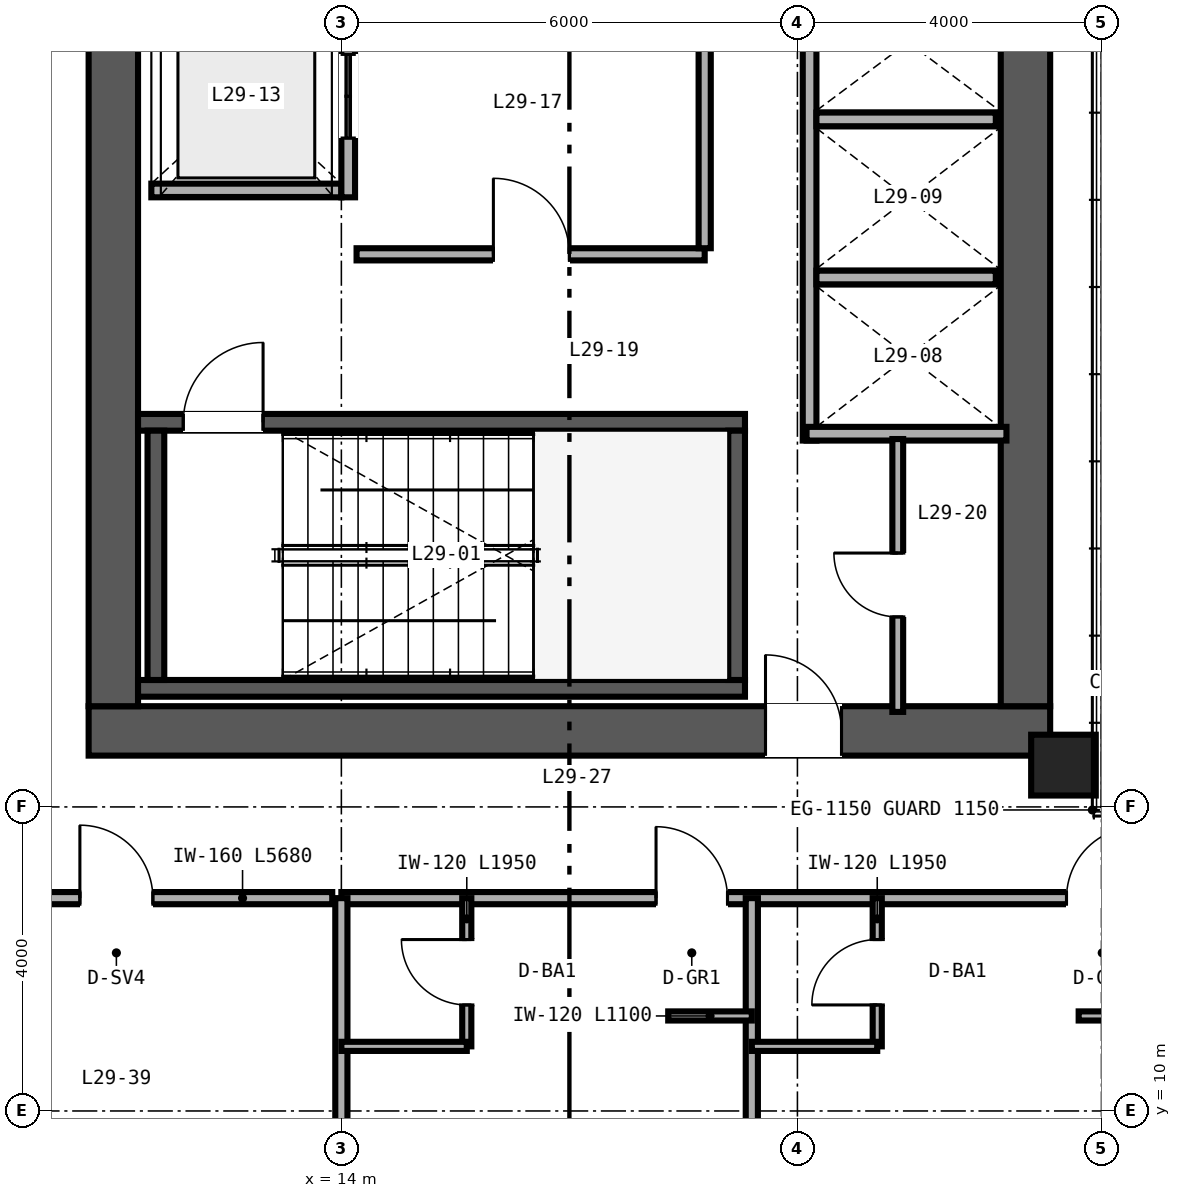
"""IFC4 building model, lengths in metres.
Left out: names, types, materials, properties, quantities, classifications, styles, units other than length and angle.
Written with IfcOpenShell. Run it as: python <this file> out.ifc"""

import sys

from ifc_helpers import new_model, si_unit, direction, frame, frame_2d, origin, origin_2d, place, context, subcontext, project, spatial, rectangle, hollow_rectangle, extrude, source, transform, mapped, element, fill, save


model = new_model("IFC4")
c1 = context("Model", 3, precision=1e-05, world=origin(), true_north=direction((0.0, 1.0)))
c2 = subcontext(c1, "Body", "Model", "MODEL_VIEW")
j1 = project(units=[si_unit("LENGTHUNIT", "METRE"), si_unit("PLANEANGLEUNIT", "RADIAN")], contexts=[c1])
p1 = place(None, origin())
s1 = spatial("IfcSite", under=j1, at=p1, CompositionType="ELEMENT")
p2 = place(p1, origin())
s2 = spatial("IfcBuilding", under=s1, at=p2, CompositionType="ELEMENT")
p3 = place(p2, frame((0.0, 0.0, 118.8)))
s3 = spatial("IfcBuildingStorey", under=s2, at=p3, CompositionType="ELEMENT", Elevation=118.8)
p4 = place(p3, frame((10.675, 15.0, 0.0), z_axis=(0.0, 0.0, 1.0), x_axis=(1.0, 0.0, 0.0)))
e1 = element("IfcWall", 1, at=p4, inside=s3, PredefinedType="SHEAR", context=c2, shape_type="SweptSolid", body=[
    extrude(rectangle(XDim=12.65, YDim=0.65, at=frame_2d((6.325, 0.0))), origin(), (0.0, 0.0, 1.0), 3.36),
])
p5 = place(p4, frame((8.905, 0.0, 0.0)))
e2 = element("IfcOpeningElement", 2, at=p5, cuts=e1, PredefinedType="OPENING", context=c2, shape_type="SweptSolid", body=[
    extrude(rectangle(XDim=1.0, YDim=2.15, at=frame_2d((0.5, 1.075))), frame((0.0, 0.335, 0.0), z_axis=(0.0, -1.0, 0.0), x_axis=(1.0, 0.0, 0.0)), (0.0, 0.0, 1.0), 0.67),
])
for number, where, z_axis, x_axis in (
    (3, (11.0, 15.325, 0.0), (0.0, 0.0, 1.0), (0.0, 1.0, 0.0)),
    (4, (23.0, 15.325, 0.0), (0.0, 0.0, 1.0), (0.0, 1.0, 0.0)),
):
    element("IfcWall", number, at=place(p3, frame(where, z_axis=z_axis, x_axis=x_axis)), inside=s3, PredefinedType="SHEAR", context=c2, shape_type="SweptSolid", body=[
        extrude(rectangle(XDim=21.35, YDim=0.65, at=frame_2d((10.675, 0.0))), origin(), (0.0, 0.0, 1.0), 3.36),
    ])
p6 = place(p3, frame((11.325, 15.56, 0.0), z_axis=(0.0, 0.0, 1.0), x_axis=(1.0, 0.0, 0.0)))
e5 = element("IfcWall", 5, at=p6, inside=s3, PredefinedType="SHEAR", context=c2, shape_type="SweptSolid", body=[
    extrude(rectangle(XDim=7.985, YDim=0.22, at=frame_2d((3.993, 0.0))), origin(), (0.0, 0.0, 1.0), 3.4),
])
p7 = place(p3, frame((11.325, 19.06, 0.0), z_axis=(0.0, 0.0, 1.0), x_axis=(1.0, 0.0, 0.0)))
e6 = element("IfcWall", 6, at=p7, inside=s3, PredefinedType="SHEAR", context=c2, shape_type="SweptSolid", body=[
    extrude(rectangle(XDim=7.985, YDim=0.22, at=frame_2d((3.993, 0.0))), origin(), (0.0, 0.0, 1.0), 3.4),
])
p8 = place(p7, frame((0.595, 0.0, 0.0)))
e7 = element("IfcOpeningElement", 7, at=p8, cuts=e6, PredefinedType="OPENING", context=c2, shape_type="SweptSolid", body=[
    extrude(rectangle(XDim=1.05, YDim=2.15, at=frame_2d((0.525, 1.075))), frame((0.0, 0.12, 0.0), z_axis=(0.0, -1.0, 0.0), x_axis=(1.0, 0.0, 0.0)), (0.0, 0.0, 1.0), 0.24),
])
for number, where, z_axis, x_axis in (
    (8, (11.56, 15.67, 0.0), (0.0, 0.0, 1.0), (0.0, 1.0, 0.0)),
    (9, (19.2, 15.67, 0.0), (0.0, 0.0, 1.0), (0.0, 1.0, 0.0)),
):
    element("IfcWall", number, at=place(p3, frame(where, z_axis=z_axis, x_axis=x_axis)), inside=s3, PredefinedType="SHEAR", context=c2, shape_type="SweptSolid", body=[
        extrude(rectangle(XDim=3.28, YDim=0.22, at=frame_2d((1.64, 0.0))), origin(), (0.0, 0.0, 1.0), 3.4),
    ])
m1 = source(origin(), c2, "Body", "SweptSolid", [
    extrude(hollow_rectangle(XDim=0.85, YDim=0.8, WallThickness=0.032, at=origin_2d()), origin(), (0.0, 0.0, 1.0), 3.36),
])
p9 = place(p3, frame((23.5, 14.55, 0.0), z_axis=(0.0, 0.0, 1.0), x_axis=(1.0, 0.0, 0.0)))
e10 = element("IfcColumn", 10, at=p9, inside=s3, PredefinedType="COLUMN", context=c2, shape_type="MappedRepresentation", body=[
    mapped(m1, transform((0.0, 0.0, 0.0), scale=1.0)),
])
p10 = place(p3, frame((20.16, 18.82, 0.0), z_axis=(0.0, 0.0, 1.0), x_axis=(0.0, 1.0, 0.0)))
e11 = element("IfcWall", 11, at=p10, inside=s3, PredefinedType="SOLIDWALL", context=c2, shape_type="SweptSolid", body=[
    extrude(rectangle(XDim=6.32, YDim=0.18, at=frame_2d((3.16, 0.0))), origin(), (0.0, 0.0, 1.0), 2.36),
])
p11 = place(p3, frame((20.12, 18.91, 0.0), z_axis=(0.0, 0.0, 1.0), x_axis=(1.0, 0.0, 0.0)))
e12 = element("IfcWall", 12, at=p11, inside=s3, PredefinedType="SOLIDWALL", context=c2, shape_type="SweptSolid", body=[
    extrude(rectangle(XDim=2.63, YDim=0.18, at=frame_2d((1.315, 0.0))), origin(), (0.0, 0.0, 1.0), 3.36),
])
p12 = place(p3, frame((20.25, 20.965, 0.0), z_axis=(0.0, 0.0, 1.0), x_axis=(1.0, 0.0, 0.0)))
e13 = element("IfcWall", 13, at=p12, inside=s3, PredefinedType="SOLIDWALL", context=c2, shape_type="SweptSolid", body=[
    extrude(rectangle(XDim=2.36, YDim=0.18, at=frame_2d((1.18, 0.0))), origin(), (0.0, 0.0, 1.0), 2.36),
])
p13 = place(p3, frame((20.25, 23.045, 0.0), z_axis=(0.0, 0.0, 1.0), x_axis=(1.0, 0.0, 0.0)))
e14 = element("IfcWall", 14, at=p13, inside=s3, PredefinedType="SOLIDWALL", context=c2, shape_type="SweptSolid", body=[
    extrude(rectangle(XDim=2.36, YDim=0.18, at=frame_2d((1.18, 0.0))), origin(), (0.0, 0.0, 1.0), 3.36),
])
p14 = place(p3, frame((11.5, 22.11, 0.0), z_axis=(0.0, 0.0, 1.0), x_axis=(1.0, 0.0, 0.0)))
e15 = element("IfcWall", 15, at=p14, inside=s3, PredefinedType="SOLIDWALL", context=c2, shape_type="SweptSolid", body=[
    extrude(rectangle(XDim=2.5, YDim=0.18, at=frame_2d((1.25, 0.0))), origin(), (0.0, 0.0, 1.0), 3.36),
])
p15 = place(p3, frame((14.09, 22.02, 0.0), z_axis=(0.0, 0.0, 1.0), x_axis=(0.0, 1.0, 0.0)))
e16 = element("IfcWall", 16, at=p15, inside=s3, PredefinedType="SOLIDWALL", context=c2, shape_type="SweptSolid", body=[
    extrude(rectangle(XDim=2.66, YDim=0.18, at=frame_2d((1.33, 0.0))), origin(), (0.0, 0.0, 1.0), 3.36),
])
p16 = place(p15, frame((0.78, 0.0, 0.0)))
e17 = element("IfcOpeningElement", 17, at=p16, cuts=e16, PredefinedType="OPENING", context=c2, shape_type="SweptSolid", body=[
    extrude(rectangle(XDim=1.1, YDim=2.2, at=frame_2d((0.55, 1.1))), frame((0.0, 0.1, 0.0), z_axis=(0.0, -1.0, 0.0), x_axis=(1.0, 0.0, 0.0)), (0.0, 0.0, 1.0), 0.2),
])
p17 = place(p3, frame((14.2, 21.27, 0.0), z_axis=(0.0, 0.0, 1.0), x_axis=(1.0, 0.0, 0.0)))
e18 = element("IfcWall", 18, at=p17, inside=s3, PredefinedType="PARTITIONING", context=c2, shape_type="SweptSolid", body=[
    extrude(rectangle(XDim=4.58, YDim=0.16, at=frame_2d((2.29, 0.0))), origin(), (0.0, 0.0, 1.0), 3.36),
])
p18 = place(p17, frame((1.8, 0.0, 0.0)))
e19 = element("IfcOpeningElement", 19, at=p18, cuts=e18, PredefinedType="OPENING", context=c2, shape_type="SweptSolid", body=[
    extrude(rectangle(XDim=1.0, YDim=2.15, at=frame_2d((0.5, 1.075))), frame((0.0, 0.09, 0.0), z_axis=(0.0, -1.0, 0.0), x_axis=(1.0, 0.0, 0.0)), (0.0, 0.0, 1.0), 0.18),
])
p19 = place(p3, frame((18.78, 21.35, 0.0), z_axis=(0.0, 0.0, 1.0), x_axis=(0.0, 1.0, 0.0)))
e20 = element("IfcWall", 20, at=p19, inside=s3, PredefinedType="PARTITIONING", context=c2, shape_type="SweptSolid", body=[
    extrude(rectangle(XDim=3.81, YDim=0.16, at=frame_2d((1.905, 0.0))), origin(), (0.0, 0.0, 1.0), 3.36),
])
p20 = place(p3, frame((21.32, 15.25, 0.0), z_axis=(0.0, 0.0, 1.0), x_axis=(0.0, 1.0, 0.0)))
e21 = element("IfcWall", 21, at=p20, inside=s3, PredefinedType="PARTITIONING", context=c2, shape_type="SweptSolid", body=[
    extrude(rectangle(XDim=3.59, YDim=0.142, at=frame_2d((1.795, 0.0))), origin(), (0.0, 0.0, 1.0), 3.36),
])
p21 = place(p20, frame((1.25, 0.0, 0.0)))
e22 = element("IfcOpeningElement", 22, at=p21, cuts=e21, PredefinedType="OPENING", context=c2, shape_type="SweptSolid", body=[
    extrude(rectangle(XDim=0.84, YDim=2.1, at=frame_2d((0.42, 1.05))), frame((0.0, 0.081, 0.0), z_axis=(0.0, -1.0, 0.0), x_axis=(1.0, 0.0, 0.0)), (0.0, 0.0, 1.0), 0.162),
])
p22 = place(p3, frame((8.2, 12.8, 0.0), z_axis=(0.0, 0.0, 1.0), x_axis=(1.0, 0.0, 0.0)))
e23 = element("IfcWall", 23, at=p22, inside=s3, PredefinedType="PARTITIONING", context=c2, shape_type="SweptSolid", body=[
    extrude(rectangle(XDim=5.68, YDim=0.16, at=frame_2d((2.84, 0.0))), origin(), (0.0, 0.0, 1.0), 3.36),
])
p23 = place(p22, frame((2.36, 0.0, 0.0)))
e24 = element("IfcOpeningElement", 24, at=p23, cuts=e23, PredefinedType="OPENING", context=c2, shape_type="SweptSolid", body=[
    extrude(rectangle(XDim=0.96, YDim=2.15, at=frame_2d((0.48, 1.075))), frame((0.0, 0.09, 0.0), z_axis=(0.0, -1.0, 0.0), x_axis=(1.0, 0.0, 0.0)), (0.0, 0.0, 1.0), 0.18),
])
p24 = place(p3, frame((14.0, 12.8, 0.0), z_axis=(0.0, 0.0, 1.0), x_axis=(1.0, 0.0, 0.0)))
e25 = element("IfcWall", 25, at=p24, inside=s3, PredefinedType="PARTITIONING", context=c2, shape_type="SweptSolid", body=[
    extrude(rectangle(XDim=36.0, YDim=0.16, at=frame_2d((18.0, 0.0))), origin(), (0.0, 0.0, 1.0), 2.581),
])
p25 = place(p24, frame((4.14, 0.0, 0.0)))
e26 = element("IfcOpeningElement", 26, at=p25, cuts=e25, PredefinedType="OPENING", context=c2, shape_type="SweptSolid", body=[
    extrude(rectangle(XDim=0.94, YDim=2.15, at=frame_2d((0.47, 1.075))), frame((0.0, 0.09, 0.0), z_axis=(0.0, -1.0, 0.0), x_axis=(1.0, 0.0, 0.0)), (0.0, 0.0, 1.0), 0.18),
])
p26 = place(p24, frame((9.54, 0.0, 0.0)))
e27 = element("IfcOpeningElement", 27, at=p26, cuts=e25, PredefinedType="OPENING", context=c2, shape_type="SweptSolid", body=[
    extrude(rectangle(XDim=0.94, YDim=2.15, at=frame_2d((0.47, 1.075))), frame((0.0, 0.09, 0.0), z_axis=(0.0, -1.0, 0.0), x_axis=(1.0, 0.0, 0.0)), (0.0, 0.0, 1.0), 0.18),
])
p27 = place(p24, frame((13.22, 0.0, 0.0)))
e28 = element("IfcOpeningElement", 28, at=p27, cuts=e25, PredefinedType="OPENING", context=c2, shape_type="SweptSolid", body=[
    extrude(rectangle(XDim=0.96, YDim=2.15, at=frame_2d((0.48, 1.075))), frame((0.0, 0.09, 0.0), z_axis=(0.0, -1.0, 0.0), x_axis=(1.0, 0.0, 0.0)), (0.0, 0.0, 1.0), 0.18),
])
p28 = place(p24, frame((19.02, 0.0, 0.0)))
e29 = element("IfcOpeningElement", 29, at=p28, cuts=e25, PredefinedType="OPENING", context=c2, shape_type="SweptSolid", body=[
    extrude(rectangle(XDim=0.96, YDim=2.15, at=frame_2d((0.48, 1.075))), frame((0.0, 0.09, 0.0), z_axis=(0.0, -1.0, 0.0), x_axis=(1.0, 0.0, 0.0)), (0.0, 0.0, 1.0), 0.18),
])
p29 = place(p24, frame((24.62, 0.0, 0.0)))
e30 = element("IfcOpeningElement", 30, at=p29, cuts=e25, PredefinedType="OPENING", context=c2, shape_type="SweptSolid", body=[
    extrude(rectangle(XDim=0.96, YDim=2.15, at=frame_2d((0.48, 1.075))), frame((0.0, 0.09, 0.0), z_axis=(0.0, -1.0, 0.0), x_axis=(1.0, 0.0, 0.0)), (0.0, 0.0, 1.0), 0.18),
])
p30 = place(p24, frame((30.74, 0.0, 0.0)))
e31 = element("IfcOpeningElement", 31, at=p30, cuts=e25, PredefinedType="OPENING", context=c2, shape_type="SweptSolid", body=[
    extrude(rectangle(XDim=0.94, YDim=2.15, at=frame_2d((0.47, 1.075))), frame((0.0, 0.09, 0.0), z_axis=(0.0, -1.0, 0.0), x_axis=(1.0, 0.0, 0.0)), (0.0, 0.0, 1.0), 0.18),
])
p31 = place(p24, frame((33.52, 0.0, 0.0)))
e32 = element("IfcOpeningElement", 32, at=p31, cuts=e25, PredefinedType="OPENING", context=c2, shape_type="SweptSolid", body=[
    extrude(rectangle(XDim=0.96, YDim=2.15, at=frame_2d((0.48, 1.075))), frame((0.0, 0.09, 0.0), z_axis=(0.0, -1.0, 0.0), x_axis=(1.0, 0.0, 0.0)), (0.0, 0.0, 1.0), 0.18),
])
for number, where, z_axis, x_axis in (
    (33, (14.0, 2.36, 0.0), (0.0, 0.0, 1.0), (0.0, 1.0, 0.0)),
    (34, (19.4, 2.36, 0.0), (0.0, 0.0, 1.0), (0.0, 1.0, 0.0)),
):
    element("IfcWall", number, at=place(p3, frame(where, z_axis=z_axis, x_axis=x_axis)), inside=s3, PredefinedType="PARTITIONING", context=c2, shape_type="SweptSolid", body=[
        extrude(rectangle(XDim=10.44, YDim=0.16, at=frame_2d((5.22, 0.0))), origin(), (0.0, 0.0, 1.0), 2.667),
    ])
p32 = place(p3, frame((15.65, 10.85, 0.0), z_axis=(0.0, 0.0, 1.0), x_axis=(0.0, 1.0, 0.0)))
e35 = element("IfcWall", 35, at=p32, inside=s3, PredefinedType="PARTITIONING", context=c2, shape_type="SweptSolid", body=[
    extrude(rectangle(XDim=1.95, YDim=0.12, at=frame_2d((0.975, 0.0))), origin(), (0.0, 0.0, 1.0), 3.36),
])
p33 = place(p32, frame((0.545, 0.0, 0.0)))
e36 = element("IfcOpeningElement", 36, at=p33, cuts=e35, PredefinedType="OPENING", context=c2, shape_type="SweptSolid", body=[
    extrude(rectangle(XDim=0.86, YDim=2.1, at=frame_2d((0.43, 1.05))), frame((0.0, 0.07, 0.0), z_axis=(0.0, -1.0, 0.0), x_axis=(1.0, 0.0, 0.0)), (0.0, 0.0, 1.0), 0.14),
])
p34 = place(p3, frame((14.0, 10.85, 0.0), z_axis=(0.0, 0.0, 1.0), x_axis=(1.0, 0.0, 0.0)))
e37 = element("IfcWall", 37, at=p34, inside=s3, PredefinedType="PARTITIONING", context=c2, shape_type="SweptSolid", body=[
    extrude(rectangle(XDim=1.65, YDim=0.12, at=frame_2d((0.825, 0.0))), origin(), (0.0, 0.0, 1.0), 3.36),
])
p35 = place(p3, frame((18.3, 11.25, 0.0), z_axis=(0.0, 0.0, 1.0), x_axis=(1.0, 0.0, 0.0)))
e38 = element("IfcWall", 38, at=p35, inside=s3, PredefinedType="PARTITIONING", context=c2, shape_type="SweptSolid", body=[
    extrude(rectangle(XDim=1.1, YDim=0.12, at=frame_2d((0.55, 0.0))), origin(), (0.0, 0.0, 1.0), 3.36),
])
p36 = place(p3, frame((21.05, 10.85, 0.0), z_axis=(0.0, 0.0, 1.0), x_axis=(0.0, 1.0, 0.0)))
e39 = element("IfcWall", 39, at=p36, inside=s3, PredefinedType="PARTITIONING", context=c2, shape_type="SweptSolid", body=[
    extrude(rectangle(XDim=1.95, YDim=0.12, at=frame_2d((0.975, 0.0))), origin(), (0.0, 0.0, 1.0), 3.36),
])
p37 = place(p36, frame((0.545, 0.0, 0.0)))
e40 = element("IfcOpeningElement", 40, at=p37, cuts=e39, PredefinedType="OPENING", context=c2, shape_type="SweptSolid", body=[
    extrude(rectangle(XDim=0.86, YDim=2.1, at=frame_2d((0.43, 1.05))), frame((0.0, 0.07, 0.0), z_axis=(0.0, -1.0, 0.0), x_axis=(1.0, 0.0, 0.0)), (0.0, 0.0, 1.0), 0.14),
])
p38 = place(p3, frame((19.4, 10.85, 0.0), z_axis=(0.0, 0.0, 1.0), x_axis=(1.0, 0.0, 0.0)))
e41 = element("IfcWall", 41, at=p38, inside=s3, PredefinedType="PARTITIONING", context=c2, shape_type="SweptSolid", body=[
    extrude(rectangle(XDim=1.65, YDim=0.12, at=frame_2d((0.825, 0.0))), origin(), (0.0, 0.0, 1.0), 3.36),
])
p39 = place(p3, frame((23.7, 11.25, 0.0), z_axis=(0.0, 0.0, 1.0), x_axis=(1.0, 0.0, 0.0)))
e42 = element("IfcWall", 42, at=p39, inside=s3, PredefinedType="PARTITIONING", context=c2, shape_type="SweptSolid", body=[
    extrude(rectangle(XDim=1.1, YDim=0.12, at=frame_2d((0.55, 0.0))), origin(), (0.0, 0.0, 1.0), 2.581),
])
m2 = source(origin(), c2, "Body", "SweptSolid", [
    extrude(rectangle(XDim=1.05, YDim=2.15, at=frame_2d((0.525, 1.075))), frame((0.0, 0.025, 0.0), z_axis=(0.0, -1.0, 0.0), x_axis=(1.0, 0.0, 0.0)), (0.0, 0.0, 1.0), 0.05),
])
p40 = place(p8, origin())
e43 = element("IfcDoor", 43, at=p40, inside=s3, OperationType="SINGLE_SWING_RIGHT", PredefinedType="DOOR", context=c2, shape_type="MappedRepresentation", body=[
    mapped(m2, transform((0.0, 0.0, 0.0), scale=1.0)),
])
fill(e7, e43)
m3 = source(origin(), c2, "Body", "SweptSolid", [
    extrude(rectangle(XDim=1.1, YDim=2.2, at=frame_2d((0.55, 1.1))), frame((0.0, 0.025, 0.0), z_axis=(0.0, -1.0, 0.0), x_axis=(1.0, 0.0, 0.0)), (0.0, 0.0, 1.0), 0.05),
])
p41 = place(p16, origin())
e44 = element("IfcDoor", 44, at=p41, inside=s3, OperationType="DOUBLE_DOOR_SLIDING", PredefinedType="DOOR", context=c2, shape_type="MappedRepresentation", body=[
    mapped(m3, transform((0.0, 0.0, 0.0), scale=1.0)),
])
fill(e17, e44)
m4 = source(origin(), c2, "Body", "SweptSolid", [
    extrude(rectangle(XDim=1.0, YDim=2.15, at=frame_2d((0.5, 1.075))), frame((0.0, 0.025, 0.0), z_axis=(0.0, -1.0, 0.0), x_axis=(1.0, 0.0, 0.0)), (0.0, 0.0, 1.0), 0.05),
])
p42 = place(p18, origin())
e45 = element("IfcDoor", 45, at=p42, inside=s3, OperationType="SINGLE_SWING_LEFT", PredefinedType="DOOR", context=c2, shape_type="MappedRepresentation", body=[
    mapped(m4, transform((0.0, 0.0, 0.0), scale=1.0)),
])
fill(e19, e45)
m5 = source(origin(), c2, "Body", "SweptSolid", [
    extrude(rectangle(XDim=0.84, YDim=2.1, at=frame_2d((0.42, 1.05))), frame((0.0, 0.025, 0.0), z_axis=(0.0, -1.0, 0.0), x_axis=(1.0, 0.0, 0.0)), (0.0, 0.0, 1.0), 0.05),
])
p43 = place(p21, origin())
e46 = element("IfcDoor", 46, at=p43, inside=s3, OperationType="SINGLE_SWING_RIGHT", PredefinedType="DOOR", context=c2, shape_type="MappedRepresentation", body=[
    mapped(m5, transform((0.0, 0.0, 0.0), scale=1.0)),
])
fill(e22, e46)
p44 = place(p5, origin())
e47 = element("IfcDoor", 47, at=p44, inside=s3, OperationType="SINGLE_SWING_LEFT", PredefinedType="DOOR", context=c2, shape_type="MappedRepresentation", body=[
    mapped(m4, transform((0.0, 0.0, 0.0), scale=1.0)),
])
fill(e2, e47)
m6 = source(origin(), c2, "Body", "SweptSolid", [
    extrude(rectangle(XDim=0.96, YDim=2.15, at=frame_2d((0.48, 1.075))), frame((0.0, 0.025, 0.0), z_axis=(0.0, -1.0, 0.0), x_axis=(1.0, 0.0, 0.0)), (0.0, 0.0, 1.0), 0.05),
])
p45 = place(p23, origin())
e48 = element("IfcDoor", 48, at=p45, inside=s3, OperationType="SINGLE_SWING_LEFT", PredefinedType="DOOR", context=c2, shape_type="MappedRepresentation", body=[
    mapped(m6, transform((0.0, 0.0, 0.0), scale=1.0)),
])
fill(e24, e48)
m7 = source(origin(), c2, "Body", "SweptSolid", [
    extrude(rectangle(XDim=0.86, YDim=2.1, at=frame_2d((0.43, 1.05))), frame((0.0, 0.025, 0.0), z_axis=(0.0, -1.0, 0.0), x_axis=(1.0, 0.0, 0.0)), (0.0, 0.0, 1.0), 0.05),
])
p46 = place(p33, origin())
e49 = element("IfcDoor", 49, at=p46, inside=s3, OperationType="SINGLE_SWING_RIGHT", PredefinedType="DOOR", context=c2, shape_type="MappedRepresentation", body=[
    mapped(m7, transform((0.0, 0.0, 0.0), scale=1.0)),
])
fill(e36, e49)
p47 = place(p37, origin())
e50 = element("IfcDoor", 50, at=p47, inside=s3, OperationType="SINGLE_SWING_LEFT", PredefinedType="DOOR", context=c2, shape_type="MappedRepresentation", body=[
    mapped(m7, transform((0.0, 0.0, 0.0), scale=1.0)),
])
fill(e40, e50)
m8 = source(origin(), c2, "Body", "SweptSolid", [
    extrude(rectangle(XDim=0.94, YDim=2.15, at=frame_2d((0.47, 1.075))), frame((0.0, 0.025, 0.0), z_axis=(0.0, -1.0, 0.0), x_axis=(1.0, 0.0, 0.0)), (0.0, 0.0, 1.0), 0.05),
])
p48 = place(p25, origin())
e51 = element("IfcDoor", 51, at=p48, inside=s3, OperationType="SINGLE_SWING_LEFT", PredefinedType="DOOR", context=c2, shape_type="MappedRepresentation", body=[
    mapped(m8, transform((0.0, 0.0, 0.0), scale=1.0)),
])
fill(e26, e51)
p49 = place(p26, origin())
e52 = element("IfcDoor", 52, at=p49, inside=s3, OperationType="SINGLE_SWING_RIGHT", PredefinedType="DOOR", context=c2, shape_type="MappedRepresentation", body=[
    mapped(m8, transform((0.0, 0.0, 0.0), scale=1.0)),
])
fill(e27, e52)
save(model, sys.argv[1])
